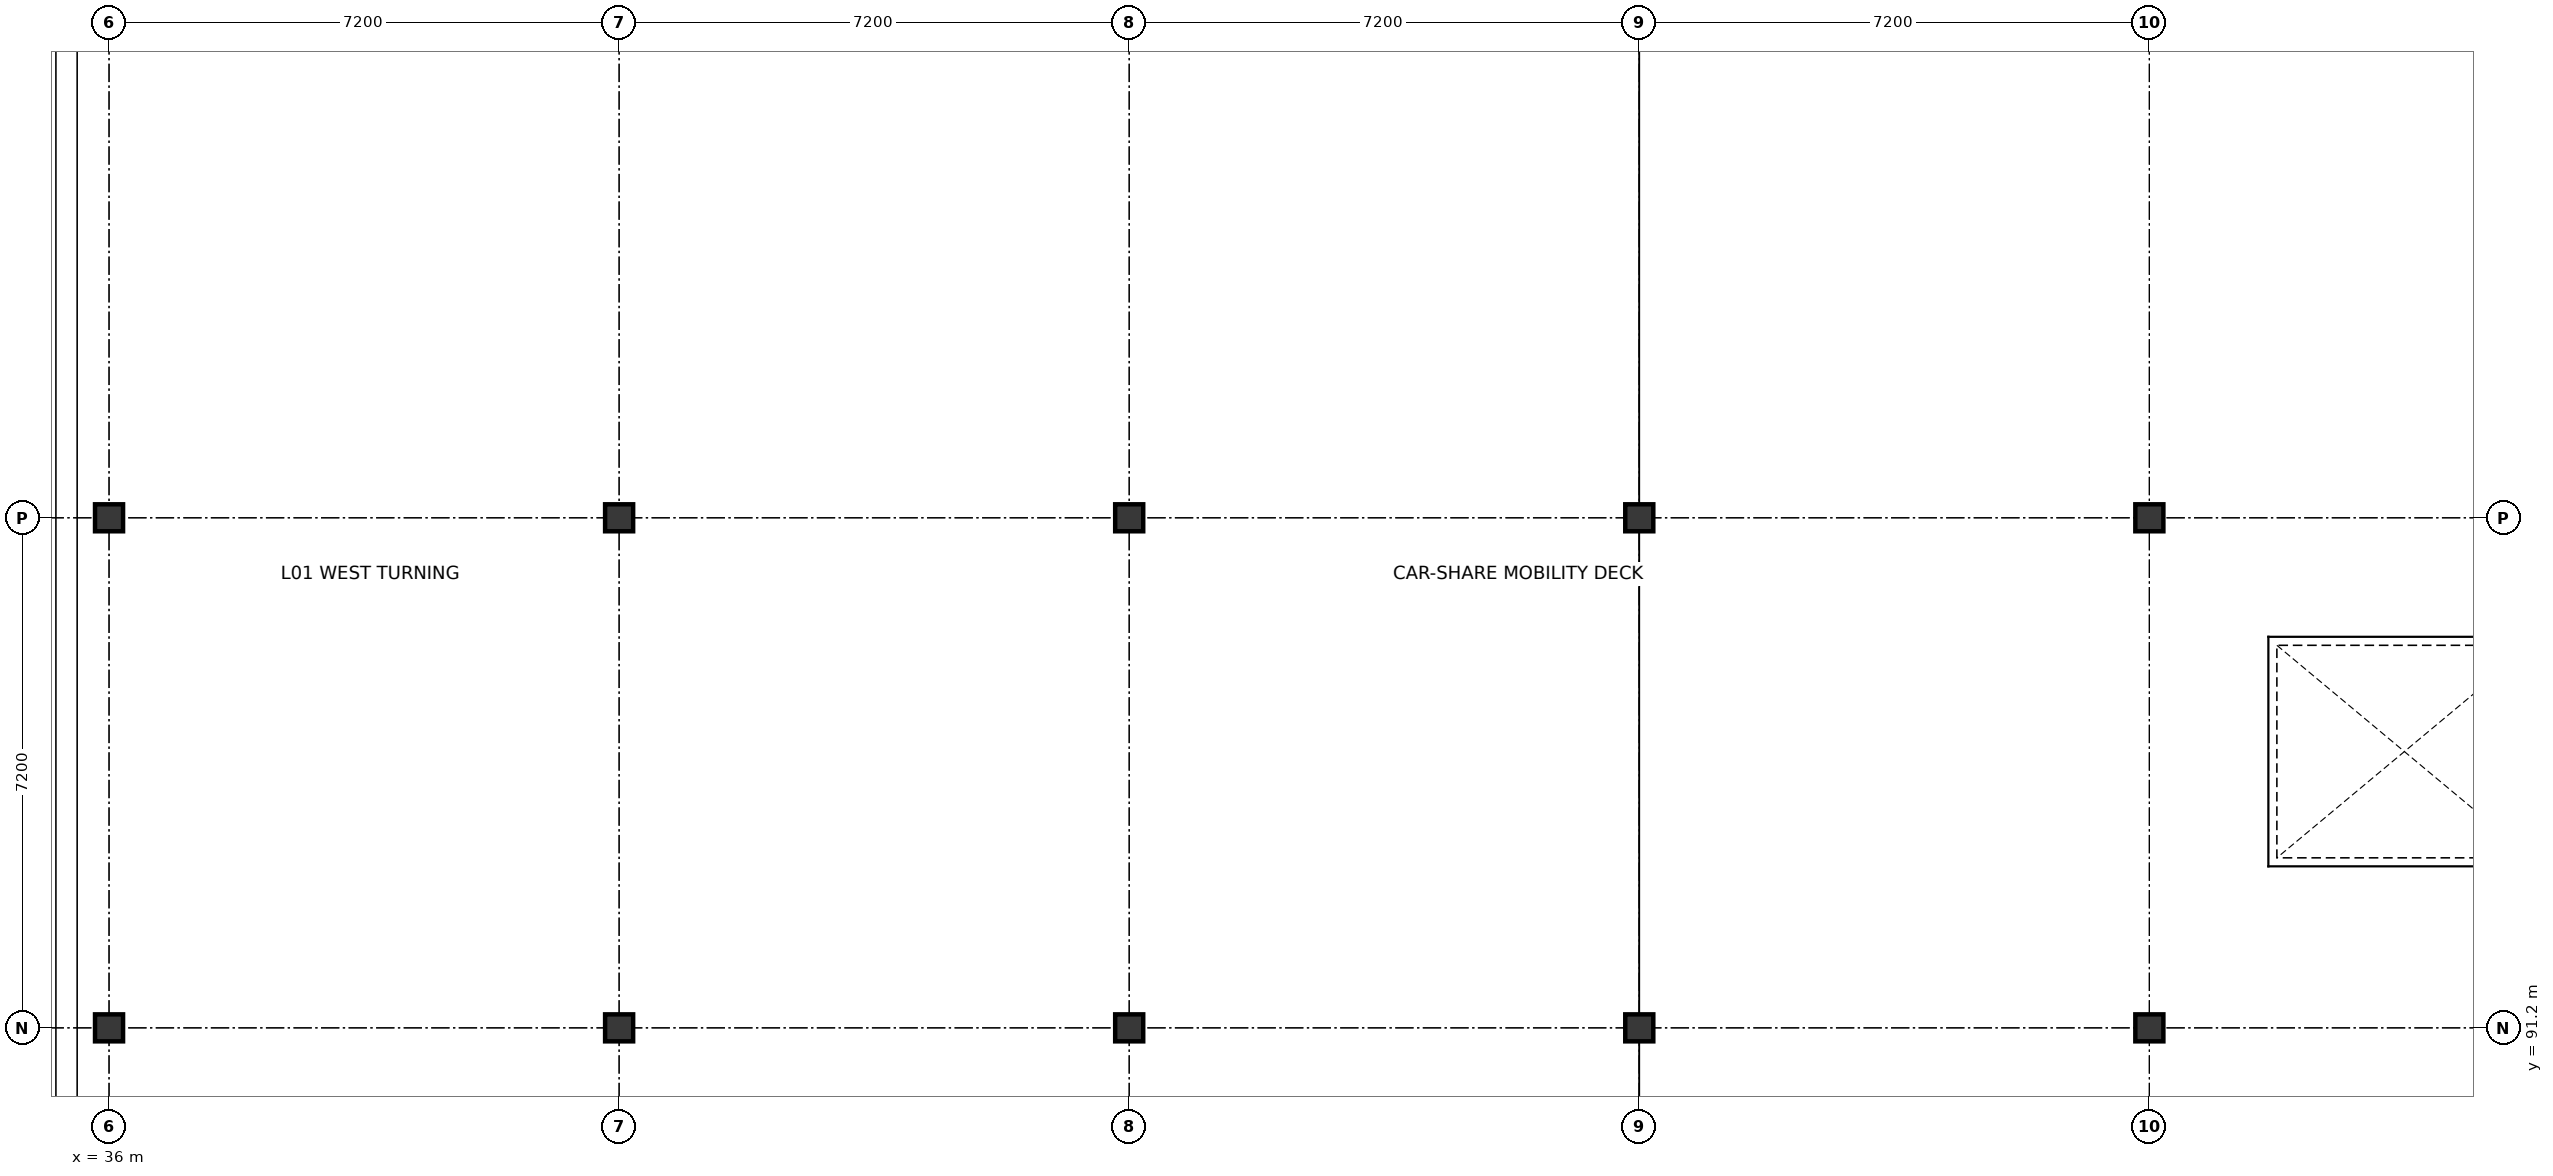
"""IFC4 building model, lengths in metres.
Left out: names, types, materials, properties, quantities, classifications, styles, units other than length and angle.
Written with IfcOpenShell. Run it as: python <this file> out.ifc"""

import sys

from ifc_helpers import new_model, si_unit, direction, frame, origin, origin_2d, place, context, subcontext, project, spatial, i_section, extrude, element, save


model = new_model("IFC4")
c1 = context("Model", 3, precision=1e-05, world=origin(), true_north=direction((0.0, 1.0)))
c2 = subcontext(c1, "Body", "Model", "MODEL_VIEW")
j1 = project(units=[si_unit("LENGTHUNIT", "METRE"), si_unit("PLANEANGLEUNIT", "RADIAN")], contexts=[c1])
p1 = place(None, origin())
s1 = spatial("IfcSite", under=j1, at=p1, CompositionType="ELEMENT")
p2 = place(p1, origin())
s2 = spatial("IfcBuilding", under=s1, at=p2, CompositionType="ELEMENT")
p3 = place(p2, frame((0.0, 0.0, 5.4)))
s3 = spatial("IfcBuildingStorey", under=s2, at=p3, CompositionType="ELEMENT", Elevation=5.4)
for number, where, z_axis, x_axis in (
    (1, (36.0, 91.2, 0.0), (0.0, 0.0, 1.0), (1.0, 0.0, 0.0)),
    (2, (36.0, 98.4, 0.0), (0.0, 0.0, 1.0), (1.0, 0.0, 0.0)),
    (3, (43.2, 91.2, 0.0), (0.0, 0.0, 1.0), (1.0, 0.0, 0.0)),
    (4, (43.2, 98.4, 0.0), (0.0, 0.0, 1.0), (1.0, 0.0, 0.0)),
    (5, (50.4, 91.2, 0.0), (0.0, 0.0, 1.0), (1.0, 0.0, 0.0)),
    (6, (50.4, 98.4, 0.0), (0.0, 0.0, 1.0), (1.0, 0.0, 0.0)),
    (7, (57.6, 91.2, 0.0), (0.0, 0.0, 1.0), (1.0, 0.0, 0.0)),
    (8, (57.6, 98.4, 0.0), (0.0, 0.0, 1.0), (1.0, 0.0, 0.0)),
    (9, (64.8, 91.2, 0.0), (0.0, 0.0, 1.0), (1.0, 0.0, 0.0)),
    (10, (64.8, 98.4, 0.0), (0.0, 0.0, 1.0), (1.0, 0.0, 0.0)),
):
    element("IfcColumn", number, at=place(p3, frame(where, z_axis=z_axis, x_axis=x_axis)), inside=s3, PredefinedType="COLUMN", context=c2, shape_type="SweptSolid", body=[
        extrude(i_section(OverallWidth=0.396, OverallDepth=0.381, WebThickness=0.019, FlangeThickness=0.03, FilletRadius=0.015, at=origin_2d()), origin(), (0.0, 0.0, 1.0), 3.9),
    ])
save(model, sys.argv[1])
